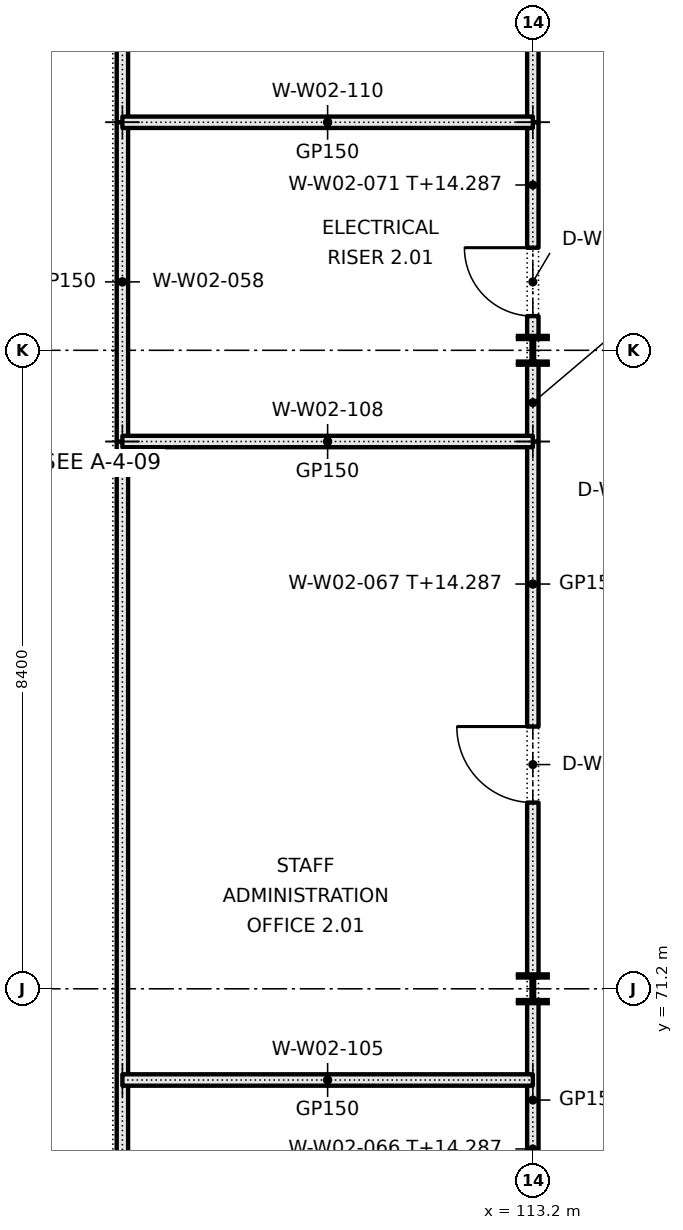
"""IFC4 building model, lengths in metres.
Left out: names, types, materials, properties, quantities, classifications, styles, units other than length and angle.
Written with IfcOpenShell. Run it as: python <this file> out.ifc"""

import sys

from ifc_helpers import new_model, si_unit, direction, frame, frame_2d, origin, origin_2d, place, context, subcontext, project, spatial, rectangle, i_section, extrude, element, fill, save


model = new_model("IFC4")
c1 = context("Model", 3, precision=1e-05, world=origin(), true_north=direction((0.0, 1.0)))
c2 = subcontext(c1, "Body", "Model", "MODEL_VIEW")
j1 = project(units=[si_unit("LENGTHUNIT", "METRE"), si_unit("PLANEANGLEUNIT", "RADIAN")], contexts=[c1])
p1 = place(None, origin())
s1 = spatial("IfcSite", under=j1, at=p1, CompositionType="ELEMENT")
p2 = place(p1, origin())
s2 = spatial("IfcBuilding", under=s1, at=p2, CompositionType="ELEMENT")
p3 = place(p2, frame((0.0, 0.0, 10.2)))
s3 = spatial("IfcBuildingStorey", under=s2, at=p3, CompositionType="ELEMENT", Elevation=10.2)
for number, where, z_axis, x_axis in (
    (1, (113.2, 71.2, 0.0), (0.0, 0.0, 1.0), (1.0, 0.0, 0.0)),
    (2, (113.2, 79.6, 0.0), (0.0, 0.0, 1.0), (1.0, 0.0, 0.0)),
):
    element("IfcColumn", number, at=place(p3, frame(where, z_axis=z_axis, x_axis=x_axis)), inside=s3, PredefinedType="COLUMN", context=c2, shape_type="SweptSolid", body=[
        extrude(i_section(OverallWidth=0.368, OverallDepth=0.356, WebThickness=0.011, FlangeThickness=0.018, FilletRadius=0.015, at=origin_2d()), origin(), (0.0, 0.0, 1.0), 4.8),
    ])
p4 = place(p3, frame((107.8, 36.4, 0.0), z_axis=(0.0, 0.0, 1.0), x_axis=(0.0, 1.0, 0.0)))
e3 = element("IfcWall", 3, at=p4, inside=s3, PredefinedType="PARTITIONING", context=c2, shape_type="SweptSolid", body=[
    extrude(rectangle(XDim=42.0, YDim=0.15, at=frame_2d((21.0, 0.0))), origin(), (0.0, 0.0, 1.0), 4.8),
])
p5 = place(p3, frame((107.8, 82.6, 0.0), z_axis=(0.0, 0.0, 1.0), x_axis=(0.0, 1.0, 0.0)))
e4 = element("IfcWall", 4, at=p5, inside=s3, PredefinedType="PARTITIONING", context=c2, shape_type="SweptSolid", body=[
    extrude(rectangle(XDim=5.4, YDim=0.15, at=frame_2d((2.7, 0.0))), origin(), (0.0, 0.0, 1.0), 4.8),
])
p6 = place(p3, frame((107.8, 78.4, 0.0), z_axis=(0.0, 0.0, 1.0), x_axis=(0.0, 1.0, 0.0)))
e5 = element("IfcWall", 5, at=p6, inside=s3, PredefinedType="PARTITIONING", context=c2, shape_type="SweptSolid", body=[
    extrude(rectangle(XDim=4.2, YDim=0.15, at=frame_2d((2.1, 0.0))), origin(), (0.0, 0.0, 1.0), 4.8),
])
p7 = place(p3, frame((113.2, 62.978, 0.0), z_axis=(0.0, 0.0, 1.0), x_axis=(0.0, 1.0, 0.0)))
e6 = element("IfcWall", 6, at=p7, inside=s3, PredefinedType="PARTITIONING", context=c2, shape_type="SweptSolid", body=[
    extrude(rectangle(XDim=8.044, YDim=0.15, at=frame_2d((4.022, 0.0))), origin(), (0.0, 0.0, 1.0), 4.087),
])
p8 = place(p7, frame((0.172, 0.0, 0.0)))
e7 = element("IfcOpeningElement", 7, at=p8, cuts=e6, PredefinedType="OPENING", context=c2, shape_type="SweptSolid", body=[
    extrude(rectangle(XDim=1.8, YDim=2.1, at=frame_2d((0.9, 1.05))), frame((0.0, 0.085, 0.0), z_axis=(0.0, -1.0, 0.0), x_axis=(1.0, 0.0, 0.0)), (0.0, 0.0, 1.0), 0.17),
])
p9 = place(p7, frame((4.472, 0.0, 0.0)))
e8 = element("IfcOpeningElement", 8, at=p9, cuts=e6, PredefinedType="OPENING", context=c2, shape_type="SweptSolid", body=[
    extrude(rectangle(XDim=1.0, YDim=2.1, at=frame_2d((0.5, 1.05))), frame((0.0, 0.085, 0.0), z_axis=(0.0, -1.0, 0.0), x_axis=(1.0, 0.0, 0.0)), (0.0, 0.0, 1.0), 0.17),
])
p10 = place(p3, frame((113.2, 71.378, 0.0), z_axis=(0.0, 0.0, 1.0), x_axis=(0.0, 1.0, 0.0)))
e9 = element("IfcWall", 9, at=p10, inside=s3, PredefinedType="PARTITIONING", context=c2, shape_type="SweptSolid", body=[
    extrude(rectangle(XDim=7.022, YDim=0.15, at=frame_2d((3.511, 0.0))), origin(), (0.0, 0.0, 1.0), 4.087),
])
p11 = place(p10, frame((2.272, 0.0, 0.0)))
e10 = element("IfcOpeningElement", 10, at=p11, cuts=e9, PredefinedType="OPENING", context=c2, shape_type="SweptSolid", body=[
    extrude(rectangle(XDim=1.0, YDim=2.1, at=frame_2d((0.5, 1.05))), frame((0.0, 0.085, 0.0), z_axis=(0.0, -1.0, 0.0), x_axis=(1.0, 0.0, 0.0)), (0.0, 0.0, 1.0), 0.17),
])
p12 = place(p3, frame((113.2, 82.6, 0.0), z_axis=(0.0, 0.0, 1.0), x_axis=(0.0, 1.0, 0.0)))
e11 = element("IfcWall", 11, at=p12, inside=s3, PredefinedType="PARTITIONING", context=c2, shape_type="SweptSolid", body=[
    extrude(rectangle(XDim=5.222, YDim=0.15, at=frame_2d((2.611, 0.0))), origin(), (0.0, 0.0, 1.0), 4.087),
])
p13 = place(p12, frame((2.15, 0.0, 0.0)))
e12 = element("IfcOpeningElement", 12, at=p13, cuts=e11, PredefinedType="OPENING", context=c2, shape_type="SweptSolid", body=[
    extrude(rectangle(XDim=1.0, YDim=2.1, at=frame_2d((0.5, 1.05))), frame((0.0, 0.085, 0.0), z_axis=(0.0, -1.0, 0.0), x_axis=(1.0, 0.0, 0.0)), (0.0, 0.0, 1.0), 0.17),
])
p14 = place(p3, frame((113.2, 78.4, 0.0), z_axis=(0.0, 0.0, 1.0), x_axis=(0.0, 1.0, 0.0)))
e13 = element("IfcWall", 13, at=p14, inside=s3, PredefinedType="PARTITIONING", context=c2, shape_type="SweptSolid", body=[
    extrude(rectangle(XDim=1.022, YDim=0.15, at=frame_2d((0.511, 0.0))), origin(), (0.0, 0.0, 1.0), 4.087),
])
p15 = place(p3, frame((113.2, 79.778, 0.0), z_axis=(0.0, 0.0, 1.0), x_axis=(0.0, 1.0, 0.0)))
e14 = element("IfcWall", 14, at=p15, inside=s3, PredefinedType="PARTITIONING", context=c2, shape_type="SweptSolid", body=[
    extrude(rectangle(XDim=2.822, YDim=0.15, at=frame_2d((1.411, 0.0))), origin(), (0.0, 0.0, 1.0), 4.087),
])
p16 = place(p15, frame((0.272, 0.0, 0.0)))
e15 = element("IfcOpeningElement", 15, at=p16, cuts=e14, PredefinedType="OPENING", context=c2, shape_type="SweptSolid", body=[
    extrude(rectangle(XDim=0.9, YDim=2.1, at=frame_2d((0.45, 1.05))), frame((0.0, 0.085, 0.0), z_axis=(0.0, -1.0, 0.0), x_axis=(1.0, 0.0, 0.0)), (0.0, 0.0, 1.0), 0.17),
])
for number, where, z_axis, x_axis in (
    (16, (107.8, 70.0, 0.0), (0.0, 0.0, 1.0), (1.0, 0.0, 0.0)),
    (17, (107.8, 78.4, 0.0), (0.0, 0.0, 1.0), (1.0, 0.0, 0.0)),
    (18, (107.8, 82.6, 0.0), (0.0, 0.0, 1.0), (1.0, 0.0, 0.0)),
):
    element("IfcWall", number, at=place(p3, frame(where, z_axis=z_axis, x_axis=x_axis)), inside=s3, PredefinedType="PARTITIONING", context=c2, shape_type="SweptSolid", body=[
        extrude(rectangle(XDim=5.4, YDim=0.15, at=frame_2d((2.7, 0.0))), origin(), (0.0, 0.0, 1.0), 4.8),
    ])
p17 = place(p11, origin())
e19 = element("IfcDoor", 19, at=p17, inside=s3, OperationType="SINGLE_SWING_RIGHT", PredefinedType="DOOR", context=c2, shape_type="SweptSolid", body=[
    extrude(rectangle(XDim=1.0, YDim=2.1, at=frame_2d((0.5, 1.05))), frame((0.0, 0.025, 0.0), z_axis=(0.0, -1.0, 0.0), x_axis=(1.0, 0.0, 0.0)), (0.0, 0.0, 1.0), 0.05),
])
fill(e10, e19)
p18 = place(p16, origin())
e20 = element("IfcDoor", 20, at=p18, inside=s3, OperationType="SINGLE_SWING_RIGHT", PredefinedType="DOOR", context=c2, shape_type="SweptSolid", body=[
    extrude(rectangle(XDim=0.9, YDim=2.1, at=frame_2d((0.45, 1.05))), frame((0.0, 0.025, 0.0), z_axis=(0.0, -1.0, 0.0), x_axis=(1.0, 0.0, 0.0)), (0.0, 0.0, 1.0), 0.05),
])
fill(e15, e20)
save(model, sys.argv[1])
